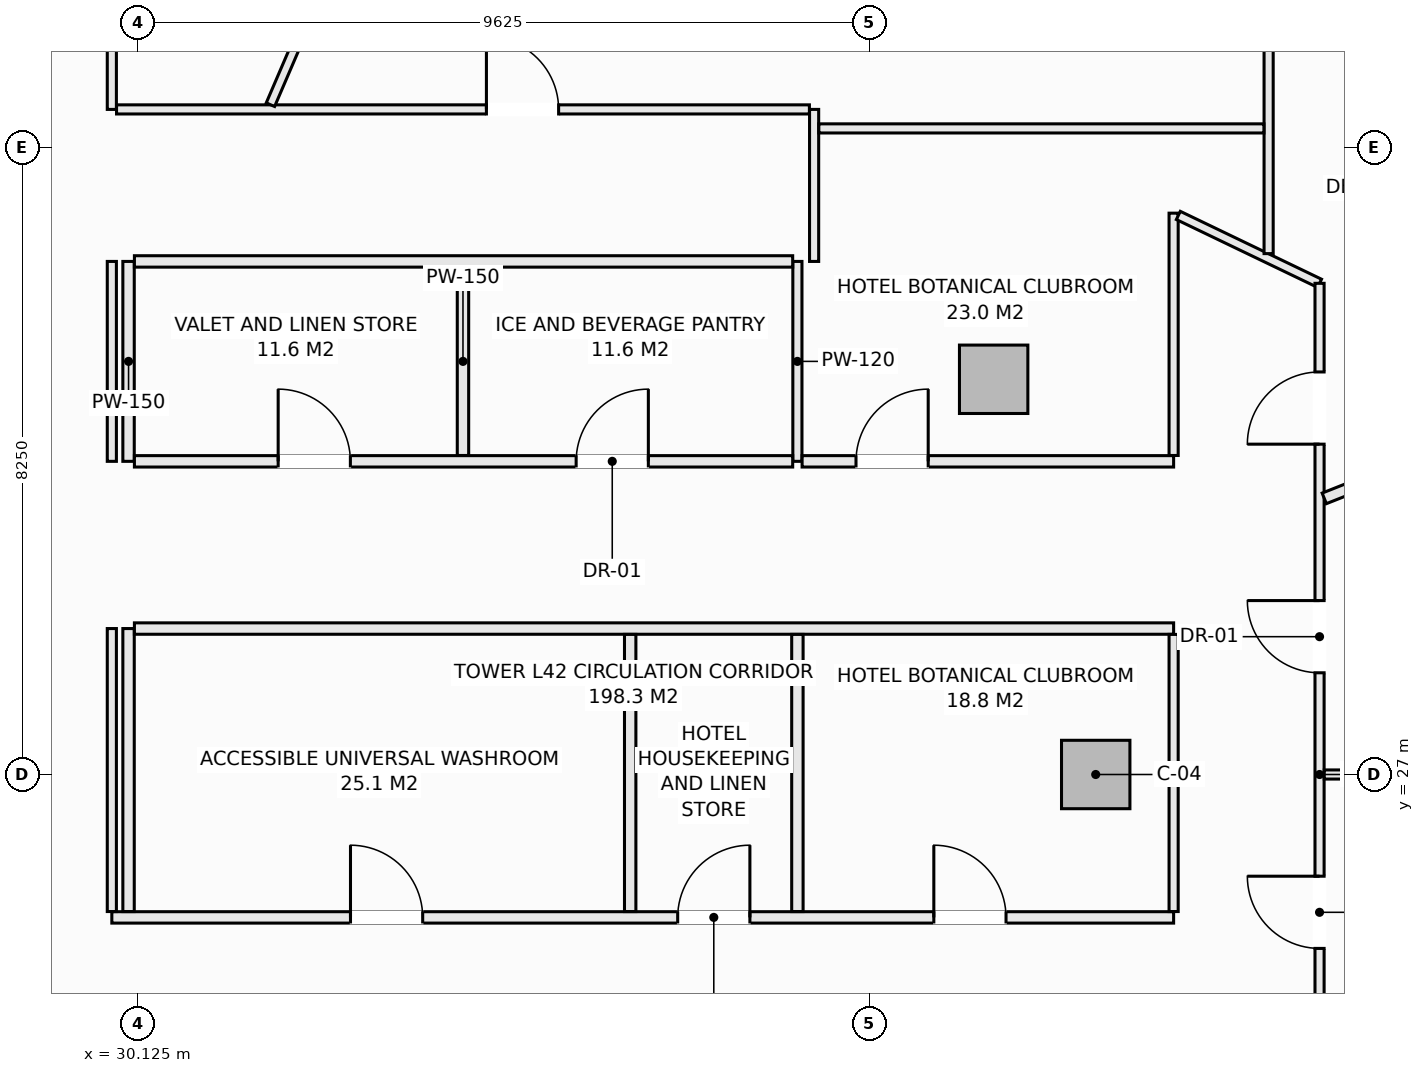
"""IFC4 building model, lengths in metres.
Left out: names, types, materials, properties, quantities, classifications, styles, units other than length and angle.
Written with IfcOpenShell. Run it as: python <this file> out.ifc"""

import sys

from ifc_helpers import new_model, si_unit, direction, frame, frame_2d, origin, origin_2d, place, context, subcontext, project, spatial, rectangle, extrude, element, fill, save


model = new_model("IFC4")
c1 = context("Model", 3, precision=1e-05, world=origin(), true_north=direction((0.0, 1.0)))
c2 = subcontext(c1, "Body", "Model", "MODEL_VIEW")
j1 = project(units=[si_unit("LENGTHUNIT", "METRE"), si_unit("PLANEANGLEUNIT", "RADIAN")], contexts=[c1])
p1 = place(None, origin())
s1 = spatial("IfcSite", under=j1, at=p1, CompositionType="ELEMENT")
p2 = place(p1, origin())
s2 = spatial("IfcBuilding", under=s1, at=p2, CompositionType="ELEMENT")
p3 = place(p2, frame((0.0, 0.0, 163.1)))
s3 = spatial("IfcBuildingStorey", under=s2, at=p3, CompositionType="ELEMENT", Elevation=163.1)
for number, where, z_axis, x_axis in (
    (1, (42.725, 27.0, -0.27), (0.0, 0.0, 1.0), (1.0, 0.0, 0.0)),
    (2, (41.382, 32.199, -0.27), (0.0, 0.0, 1.0), (1.0, 0.0, 0.0)),
):
    element("IfcColumn", number, at=place(p3, frame(where, z_axis=z_axis, x_axis=x_axis)), inside=s3, PredefinedType="COLUMN", context=c2, shape_type="SweptSolid", body=[
        extrude(rectangle(XDim=0.9, YDim=0.9, at=origin_2d()), origin(), (0.0, 0.0, 1.0), 3.4),
    ])
p4 = place(p3, frame((44.313, 38.086, 0.0), z_axis=(0.0, 0.0, 1.0), x_axis=(0.901353070301, -0.433085029363, 0.0)))
e3 = element("IfcWall", 3, at=p4, inside=s3, PredefinedType="SOLIDWALL", context=c2, shape_type="SweptSolid", body=[
    extrude(rectangle(XDim=5.336, YDim=0.3, at=frame_2d((2.668, 0.0))), origin(), (0.0, 0.0, 1.0), 2.653),
])
p5 = place(p4, frame((1.618, 0.0, 0.74)))
e4 = element("IfcOpeningElement", 4, at=p5, cuts=e3, PredefinedType="OPENING", context=c2, shape_type="SweptSolid", body=[
    extrude(rectangle(XDim=2.1, YDim=1.7, at=frame_2d((1.05, 0.85))), frame((0.0, 0.16, 0.0), z_axis=(0.0, -1.0, 0.0), x_axis=(1.0, 0.0, 0.0)), (0.0, 0.0, 1.0), 0.32),
])
p6 = place(p3, frame((29.78, 25.12, 0.0), z_axis=(0.0, 0.0, 1.0), x_axis=(1.0, 0.0, 0.0)))
e5 = element("IfcWall", 5, at=p6, inside=s3, PredefinedType="PARTITIONING", context=c2, shape_type="SweptSolid", body=[
    extrude(rectangle(XDim=13.97, YDim=0.15, at=frame_2d((6.985, 0.0))), origin(), (0.0, 0.0, 1.0), 3.13),
])
p7 = place(p6, frame((3.14, 0.0, 0.0)))
e6 = element("IfcOpeningElement", 6, at=p7, cuts=e5, PredefinedType="OPENING", context=c2, shape_type="SweptSolid", body=[
    extrude(rectangle(XDim=0.95, YDim=2.1, at=frame_2d((0.475, 1.05))), frame((0.0, 0.085, 0.0), z_axis=(0.0, -1.0, 0.0), x_axis=(1.0, 0.0, 0.0)), (0.0, 0.0, 1.0), 0.17),
])
p8 = place(p6, frame((7.445, 0.0, 0.0)))
e7 = element("IfcOpeningElement", 7, at=p8, cuts=e5, PredefinedType="OPENING", context=c2, shape_type="SweptSolid", body=[
    extrude(rectangle(XDim=0.95, YDim=2.1, at=frame_2d((0.475, 1.05))), frame((0.0, 0.085, 0.0), z_axis=(0.0, -1.0, 0.0), x_axis=(1.0, 0.0, 0.0)), (0.0, 0.0, 1.0), 0.17),
])
p9 = place(p6, frame((10.815, 0.0, 0.0)))
e8 = element("IfcOpeningElement", 8, at=p9, cuts=e5, PredefinedType="OPENING", context=c2, shape_type="SweptSolid", body=[
    extrude(rectangle(XDim=0.95, YDim=2.1, at=frame_2d((0.475, 1.05))), frame((0.0, 0.085, 0.0), z_axis=(0.0, -1.0, 0.0), x_axis=(1.0, 0.0, 0.0)), (0.0, 0.0, 1.0), 0.17),
])
p10 = place(p3, frame((30.0, 25.197, 0.0), z_axis=(0.0, 0.0, 1.0), x_axis=(0.0, 1.0, 0.0)))
e9 = element("IfcWall", 9, at=p10, inside=s3, PredefinedType="PARTITIONING", context=c2, shape_type="SweptSolid", body=[
    extrude(rectangle(XDim=3.723, YDim=0.15, at=frame_2d((1.861, 0.0))), origin(), (0.0, 0.0, 1.0), 3.13),
])
p11 = place(p3, frame((30.0, 31.12, 0.0), z_axis=(0.0, 0.0, 1.0), x_axis=(0.0, 1.0, 0.0)))
e10 = element("IfcWall", 10, at=p11, inside=s3, PredefinedType="PARTITIONING", context=c2, shape_type="SweptSolid", body=[
    extrude(rectangle(XDim=2.63, YDim=0.15, at=frame_2d((1.315, 0.0))), origin(), (0.0, 0.0, 1.0), 3.13),
])
p12 = place(p3, frame((30.077, 28.92, 0.0), z_axis=(0.0, 0.0, 1.0), x_axis=(1.0, 0.0, 0.0)))
e11 = element("IfcWall", 11, at=p12, inside=s3, PredefinedType="PARTITIONING", context=c2, shape_type="SweptSolid", body=[
    extrude(rectangle(XDim=13.673, YDim=0.15, at=frame_2d((6.836, 0.0))), origin(), (0.0, 0.0, 1.0), 3.13),
])
for number, where, z_axis, x_axis in (
    (12, (36.6, 25.197, 0.0), (0.0, 0.0, 1.0), (0.0, 1.0, 0.0)),
    (13, (38.8, 25.197, 0.0), (0.0, 0.0, 1.0), (0.0, 1.0, 0.0)),
):
    element("IfcWall", number, at=place(p3, frame(where, z_axis=z_axis, x_axis=x_axis)), inside=s3, PredefinedType="PARTITIONING", context=c2, shape_type="SweptSolid", body=[
        extrude(rectangle(XDim=3.646, YDim=0.15, at=frame_2d((1.823, 0.0))), origin(), (0.0, 0.0, 1.0), 3.13),
    ])
p13 = place(p3, frame((38.8, 31.12, 0.0), z_axis=(0.0, 0.0, 1.0), x_axis=(0.0, 1.0, 0.0)))
e14 = element("IfcWall", 14, at=p13, inside=s3, PredefinedType="PARTITIONING", context=c2, shape_type="SweptSolid", body=[
    extrude(rectangle(XDim=2.63, YDim=0.12, at=frame_2d((1.315, 0.0))), origin(), (0.0, 0.0, 1.0), 3.13),
])
p14 = place(p3, frame((30.077, 31.12, 0.0), z_axis=(0.0, 0.0, 1.0), x_axis=(1.0, 0.0, 0.0)))
e15 = element("IfcWall", 15, at=p14, inside=s3, PredefinedType="PARTITIONING", context=c2, shape_type="SweptSolid", body=[
    extrude(rectangle(XDim=8.661, YDim=0.15, at=frame_2d((4.331, 0.0))), origin(), (0.0, 0.0, 1.0), 3.13),
])
p15 = place(p14, frame((1.892, 0.0, 0.0)))
e16 = element("IfcOpeningElement", 16, at=p15, cuts=e15, PredefinedType="OPENING", context=c2, shape_type="SweptSolid", body=[
    extrude(rectangle(XDim=0.95, YDim=2.1, at=frame_2d((0.475, 1.05))), frame((0.0, 0.085, 0.0), z_axis=(0.0, -1.0, 0.0), x_axis=(1.0, 0.0, 0.0)), (0.0, 0.0, 1.0), 0.17),
])
p16 = place(p14, frame((5.812, 0.0, 0.0)))
e17 = element("IfcOpeningElement", 17, at=p16, cuts=e15, PredefinedType="OPENING", context=c2, shape_type="SweptSolid", body=[
    extrude(rectangle(XDim=0.95, YDim=2.1, at=frame_2d((0.475, 1.05))), frame((0.0, 0.085, 0.0), z_axis=(0.0, -1.0, 0.0), x_axis=(1.0, 0.0, 0.0)), (0.0, 0.0, 1.0), 0.17),
])
p17 = place(p3, frame((38.862, 31.12, 0.0), z_axis=(0.0, 0.0, 1.0), x_axis=(1.0, 0.0, 0.0)))
e18 = element("IfcWall", 18, at=p17, inside=s3, PredefinedType="PARTITIONING", context=c2, shape_type="SweptSolid", body=[
    extrude(rectangle(XDim=4.888, YDim=0.15, at=frame_2d((2.444, 0.0))), origin(), (0.0, 0.0, 1.0), 3.13),
])
p18 = place(p17, frame((0.709, 0.0, 0.0)))
e19 = element("IfcOpeningElement", 19, at=p18, cuts=e18, PredefinedType="OPENING", context=c2, shape_type="SweptSolid", body=[
    extrude(rectangle(XDim=0.95, YDim=2.1, at=frame_2d((0.475, 1.05))), frame((0.0, 0.085, 0.0), z_axis=(0.0, -1.0, 0.0), x_axis=(1.0, 0.0, 0.0)), (0.0, 0.0, 1.0), 0.17),
])
p19 = place(p3, frame((30.077, 33.75, 0.0), z_axis=(0.0, 0.0, 1.0), x_axis=(1.0, 0.0, 0.0)))
e20 = element("IfcWall", 20, at=p19, inside=s3, PredefinedType="PARTITIONING", context=c2, shape_type="SweptSolid", body=[
    extrude(rectangle(XDim=8.661, YDim=0.15, at=frame_2d((4.331, 0.0))), origin(), (0.0, 0.0, 1.0), 3.13),
])
p20 = place(p3, frame((34.4, 31.197, 0.0), z_axis=(0.0, 0.0, 1.0), x_axis=(0.0, 1.0, 0.0)))
e21 = element("IfcWall", 21, at=p20, inside=s3, PredefinedType="PARTITIONING", context=c2, shape_type="SweptSolid", body=[
    extrude(rectangle(XDim=2.476, YDim=0.15, at=frame_2d((1.238, 0.0))), origin(), (0.0, 0.0, 1.0), 3.13),
])
p21 = place(p3, frame((39.02, 33.75, 0.0), z_axis=(0.0, 0.0, 1.0), x_axis=(0.0, 1.0, 0.0)))
e22 = element("IfcWall", 22, at=p21, inside=s3, PredefinedType="PARTITIONING", context=c2, shape_type="SweptSolid", body=[
    extrude(rectangle(XDim=2.0, YDim=0.12, at=frame_2d((1.0, 0.0))), origin(), (0.0, 0.0, 1.0), 3.13),
])
p22 = place(p3, frame((29.78, 25.197, 0.0), z_axis=(0.0, 0.0, 1.0), x_axis=(0.0, 1.0, 0.0)))
e23 = element("IfcWall", 23, at=p22, inside=s3, PredefinedType="PARTITIONING", context=c2, shape_type="SweptSolid", body=[
    extrude(rectangle(XDim=3.723, YDim=0.12, at=frame_2d((1.861, 0.0))), origin(), (0.0, 0.0, 1.0), 3.13),
])
p23 = place(p3, frame((29.78, 31.12, 0.0), z_axis=(0.0, 0.0, 1.0), x_axis=(0.0, 1.0, 0.0)))
e24 = element("IfcWall", 24, at=p23, inside=s3, PredefinedType="PARTITIONING", context=c2, shape_type="SweptSolid", body=[
    extrude(rectangle(XDim=2.63, YDim=0.12, at=frame_2d((1.315, 0.0))), origin(), (0.0, 0.0, 1.0), 3.13),
])
p24 = place(p3, frame((29.78, 35.75, 0.0), z_axis=(0.0, 0.0, 1.0), x_axis=(0.0, 1.0, 0.0)))
e25 = element("IfcWall", 25, at=p24, inside=s3, PredefinedType="PARTITIONING", context=c2, shape_type="SweptSolid", body=[
    extrude(rectangle(XDim=2.688, YDim=0.12, at=frame_2d((1.344, 0.0))), origin(), (0.0, 0.0, 1.0), 3.13),
])
p25 = place(p24, frame((0.869, 0.0, 0.0)))
e26 = element("IfcOpeningElement", 26, at=p25, cuts=e25, PredefinedType="OPENING", context=c2, shape_type="SweptSolid", body=[
    extrude(rectangle(XDim=0.95, YDim=2.1, at=frame_2d((0.475, 1.05))), frame((0.0, 0.07, 0.0), z_axis=(0.0, -1.0, 0.0), x_axis=(1.0, 0.0, 0.0)), (0.0, 0.0, 1.0), 0.14),
])
p26 = place(p3, frame((29.842, 35.75, 0.0), z_axis=(0.0, 0.0, 1.0), x_axis=(1.0, 0.0, 0.0)))
e27 = element("IfcWall", 27, at=p26, inside=s3, PredefinedType="PARTITIONING", context=c2, shape_type="SweptSolid", body=[
    extrude(rectangle(XDim=9.116, YDim=0.12, at=frame_2d((4.558, 0.0))), origin(), (0.0, 0.0, 1.0), 2.505),
])
p27 = place(p26, frame((4.866, 0.0, 0.0)))
e28 = element("IfcOpeningElement", 28, at=p27, cuts=e27, PredefinedType="OPENING", context=c2, shape_type="SweptSolid", body=[
    extrude(rectangle(XDim=0.95, YDim=2.1, at=frame_2d((0.475, 1.05))), frame((0.0, 0.07, 0.0), z_axis=(0.0, -1.0, 0.0), x_axis=(1.0, 0.0, 0.0)), (0.0, 0.0, 1.0), 0.14),
])
p28 = place(p3, frame((43.75, 25.197, 0.0), z_axis=(0.0, 0.0, 1.0), x_axis=(0.0, 1.0, 0.0)))
e29 = element("IfcWall", 29, at=p28, inside=s3, PredefinedType="PARTITIONING", context=c2, shape_type="SweptSolid", body=[
    extrude(rectangle(XDim=3.646, YDim=0.12, at=frame_2d((1.823, 0.0))), origin(), (0.0, 0.0, 1.0), 3.13),
])
p29 = place(p3, frame((43.75, 31.197, 0.0), z_axis=(0.0, 0.0, 1.0), x_axis=(0.0, 1.0, 0.0)))
e30 = element("IfcWall", 30, at=p29, inside=s3, PredefinedType="PARTITIONING", context=c2, shape_type="SweptSolid", body=[
    extrude(rectangle(XDim=3.188, YDim=0.12, at=frame_2d((1.594, 0.0))), origin(), (0.0, 0.0, 1.0), 3.13),
])
p30 = place(p3, frame((43.812, 34.355, 0.0), z_axis=(0.0, 0.0, 1.0), x_axis=(0.901236415331, -0.433327732417, 0.0)))
e31 = element("IfcWall", 31, at=p30, inside=s3, PredefinedType="PARTITIONING", context=c2, shape_type="SweptSolid", body=[
    extrude(rectangle(XDim=2.062, YDim=0.12, at=frame_2d((1.031, 0.0))), origin(), (0.0, 0.0, 1.0), 3.13),
])
p31 = place(p3, frame((45.67, 20.538, 0.0), z_axis=(0.0, 0.0, 1.0), x_axis=(0.0, 1.0, 0.0)))
e32 = element("IfcWall", 32, at=p31, inside=s3, PredefinedType="PARTITIONING", context=c2, shape_type="SweptSolid", body=[
    extrude(rectangle(XDim=12.924, YDim=0.12, at=frame_2d((6.462, 0.0))), origin(), (0.0, 0.0, 1.0), 3.13),
])
p32 = place(p31, frame((1.166, 0.0, 0.0)))
e33 = element("IfcOpeningElement", 33, at=p32, cuts=e32, PredefinedType="OPENING", context=c2, shape_type="SweptSolid", body=[
    extrude(rectangle(XDim=0.95, YDim=2.1, at=frame_2d((0.475, 1.05))), frame((0.0, 0.07, 0.0), z_axis=(0.0, -1.0, 0.0), x_axis=(1.0, 0.0, 0.0)), (0.0, 0.0, 1.0), 0.14),
])
p33 = place(p31, frame((4.174, 0.0, 0.0)))
e34 = element("IfcOpeningElement", 34, at=p33, cuts=e32, PredefinedType="OPENING", context=c2, shape_type="SweptSolid", body=[
    extrude(rectangle(XDim=0.95, YDim=2.1, at=frame_2d((0.475, 1.05))), frame((0.0, 0.07, 0.0), z_axis=(0.0, -1.0, 0.0), x_axis=(1.0, 0.0, 0.0)), (0.0, 0.0, 1.0), 0.14),
])
p34 = place(p31, frame((7.8, 0.0, 0.0)))
e35 = element("IfcOpeningElement", 35, at=p34, cuts=e32, PredefinedType="OPENING", context=c2, shape_type="SweptSolid", body=[
    extrude(rectangle(XDim=0.95, YDim=2.1, at=frame_2d((0.475, 1.05))), frame((0.0, 0.07, 0.0), z_axis=(0.0, -1.0, 0.0), x_axis=(1.0, 0.0, 0.0)), (0.0, 0.0, 1.0), 0.14),
])
p35 = place(p31, frame((10.808, 0.0, 0.0)))
e36 = element("IfcOpeningElement", 36, at=p35, cuts=e32, PredefinedType="OPENING", context=c2, shape_type="SweptSolid", body=[
    extrude(rectangle(XDim=0.95, YDim=2.1, at=frame_2d((0.475, 1.05))), frame((0.0, 0.07, 0.0), z_axis=(0.0, -1.0, 0.0), x_axis=(1.0, 0.0, 0.0)), (0.0, 0.0, 1.0), 0.14),
])
p36 = place(p3, frame((45.732, 27.0, 0.0), z_axis=(0.0, 0.0, 1.0), x_axis=(1.0, 0.0, 0.0)))
e37 = element("IfcWall", 37, at=p36, inside=s3, PredefinedType="PARTITIONING", context=c2, shape_type="SweptSolid", body=[
    extrude(rectangle(XDim=6.177, YDim=0.12, at=frame_2d((3.088, 0.0))), origin(), (0.0, 0.0, 1.0), 2.505),
])
p37 = place(p3, frame((45.0, 33.853, 0.0), z_axis=(0.0, 0.0, 1.0), x_axis=(0.0, 1.0, 0.0)))
e38 = element("IfcWall", 38, at=p37, inside=s3, PredefinedType="PARTITIONING", context=c2, shape_type="SweptSolid", body=[
    extrude(rectangle(XDim=3.735, YDim=0.12, at=frame_2d((1.867, 0.0))), origin(), (0.0, 0.0, 1.0), 3.13),
])
p38 = place(p3, frame((45.732, 30.633, 0.0), z_axis=(0.0, 0.0, 1.0), x_axis=(0.929706134606, 0.368302190158, 0.0)))
e39 = element("IfcWall", 39, at=p38, inside=s3, PredefinedType="PARTITIONING", context=c2, shape_type="SweptSolid", body=[
    extrude(rectangle(XDim=5.251, YDim=0.15, at=frame_2d((2.625, 0.0))), origin(), (0.0, 0.0, 1.0), 3.13),
])
p39 = place(p3, frame((39.082, 35.5, 0.0), z_axis=(0.0, 0.0, 1.0), x_axis=(1.0, 0.0, 0.0)))
e40 = element("IfcWall", 40, at=p39, inside=s3, PredefinedType="PARTITIONING", context=c2, shape_type="SweptSolid", body=[
    extrude(rectangle(XDim=5.856, YDim=0.12, at=frame_2d((2.928, 0.0))), origin(), (0.0, 0.0, 1.0), 2.812),
])
p40 = place(p3, frame((31.867, 35.812, 0.0), z_axis=(0.0, 0.0, 1.0), x_axis=(0.394572646642, 0.918864748765, 0.0)))
e41 = element("IfcWall", 41, at=p40, inside=s3, PredefinedType="PARTITIONING", context=c2, shape_type="SweptSolid", body=[
    extrude(rectangle(XDim=8.748, YDim=0.12, at=frame_2d((4.374, 0.0))), origin(), (0.0, 0.0, 1.0), 3.13),
])
p41 = place(p5, origin())
e42 = element("IfcWindow", 42, at=p41, inside=s3, PartitioningType="SINGLE_PANEL", PredefinedType="WINDOW", context=c2, shape_type="SweptSolid", body=[
    extrude(rectangle(XDim=2.1, YDim=1.7, at=frame_2d((1.05, 0.85))), frame((0.0, 0.03, 0.0), z_axis=(0.0, -1.0, 0.0), x_axis=(1.0, 0.0, 0.0)), (0.0, 0.0, 1.0), 0.06),
])
fill(e4, e42)
p42 = place(p7, origin())
e43 = element("IfcDoor", 43, at=p42, inside=s3, OperationType="SINGLE_SWING_LEFT", PredefinedType="DOOR", context=c2, shape_type="SweptSolid", body=[
    extrude(rectangle(XDim=0.95, YDim=2.1, at=frame_2d((0.475, 1.05))), frame((0.0, 0.025, 0.0), z_axis=(0.0, -1.0, 0.0), x_axis=(1.0, 0.0, 0.0)), (0.0, 0.0, 1.0), 0.05),
])
fill(e6, e43)
p43 = place(p8, origin())
e44 = element("IfcDoor", 44, at=p43, inside=s3, OperationType="SINGLE_SWING_RIGHT", PredefinedType="DOOR", context=c2, shape_type="SweptSolid", body=[
    extrude(rectangle(XDim=0.95, YDim=2.1, at=frame_2d((0.475, 1.05))), frame((0.0, 0.025, 0.0), z_axis=(0.0, -1.0, 0.0), x_axis=(1.0, 0.0, 0.0)), (0.0, 0.0, 1.0), 0.05),
])
fill(e7, e44)
p44 = place(p15, origin())
e45 = element("IfcDoor", 45, at=p44, inside=s3, OperationType="SINGLE_SWING_LEFT", PredefinedType="DOOR", context=c2, shape_type="SweptSolid", body=[
    extrude(rectangle(XDim=0.95, YDim=2.1, at=frame_2d((0.475, 1.05))), frame((0.0, 0.025, 0.0), z_axis=(0.0, -1.0, 0.0), x_axis=(1.0, 0.0, 0.0)), (0.0, 0.0, 1.0), 0.05),
])
fill(e16, e45)
p45 = place(p16, origin())
e46 = element("IfcDoor", 46, at=p45, inside=s3, OperationType="SINGLE_SWING_RIGHT", PredefinedType="DOOR", context=c2, shape_type="SweptSolid", body=[
    extrude(rectangle(XDim=0.95, YDim=2.1, at=frame_2d((0.475, 1.05))), frame((0.0, 0.025, 0.0), z_axis=(0.0, -1.0, 0.0), x_axis=(1.0, 0.0, 0.0)), (0.0, 0.0, 1.0), 0.05),
])
fill(e17, e46)
p46 = place(p33, origin())
e47 = element("IfcDoor", 47, at=p46, inside=s3, OperationType="SINGLE_SWING_RIGHT", PredefinedType="DOOR", context=c2, shape_type="SweptSolid", body=[
    extrude(rectangle(XDim=0.95, YDim=2.1, at=frame_2d((0.475, 1.05))), frame((0.0, 0.025, 0.0), z_axis=(0.0, -1.0, 0.0), x_axis=(1.0, 0.0, 0.0)), (0.0, 0.0, 1.0), 0.05),
])
fill(e34, e47)
p47 = place(p9, origin())
e48 = element("IfcDoor", 48, at=p47, inside=s3, OperationType="SINGLE_SWING_LEFT", PredefinedType="DOOR", context=c2, shape_type="SweptSolid", body=[
    extrude(rectangle(XDim=0.95, YDim=2.1, at=frame_2d((0.475, 1.05))), frame((0.0, 0.025, 0.0), z_axis=(0.0, -1.0, 0.0), x_axis=(1.0, 0.0, 0.0)), (0.0, 0.0, 1.0), 0.05),
])
fill(e8, e48)
p48 = place(p34, origin())
e49 = element("IfcDoor", 49, at=p48, inside=s3, OperationType="SINGLE_SWING_RIGHT", PredefinedType="DOOR", context=c2, shape_type="SweptSolid", body=[
    extrude(rectangle(XDim=0.95, YDim=2.1, at=frame_2d((0.475, 1.05))), frame((0.0, 0.025, 0.0), z_axis=(0.0, -1.0, 0.0), x_axis=(1.0, 0.0, 0.0)), (0.0, 0.0, 1.0), 0.05),
])
fill(e35, e49)
p49 = place(p35, origin())
e50 = element("IfcDoor", 50, at=p49, inside=s3, OperationType="SINGLE_SWING_LEFT", PredefinedType="DOOR", context=c2, shape_type="SweptSolid", body=[
    extrude(rectangle(XDim=0.95, YDim=2.1, at=frame_2d((0.475, 1.05))), frame((0.0, 0.025, 0.0), z_axis=(0.0, -1.0, 0.0), x_axis=(1.0, 0.0, 0.0)), (0.0, 0.0, 1.0), 0.05),
])
fill(e36, e50)
p50 = place(p18, origin())
e51 = element("IfcDoor", 51, at=p50, inside=s3, OperationType="SINGLE_SWING_RIGHT", PredefinedType="DOOR", context=c2, shape_type="SweptSolid", body=[
    extrude(rectangle(XDim=0.95, YDim=2.1, at=frame_2d((0.475, 1.05))), frame((0.0, 0.025, 0.0), z_axis=(0.0, -1.0, 0.0), x_axis=(1.0, 0.0, 0.0)), (0.0, 0.0, 1.0), 0.05),
])
fill(e19, e51)
p51 = place(p27, origin())
e52 = element("IfcDoor", 52, at=p51, inside=s3, OperationType="SINGLE_SWING_LEFT", PredefinedType="DOOR", context=c2, shape_type="SweptSolid", body=[
    extrude(rectangle(XDim=0.95, YDim=2.1, at=frame_2d((0.475, 1.05))), frame((0.0, 0.025, 0.0), z_axis=(0.0, -1.0, 0.0), x_axis=(1.0, 0.0, 0.0)), (0.0, 0.0, 1.0), 0.05),
])
fill(e28, e52)
save(model, sys.argv[1])
